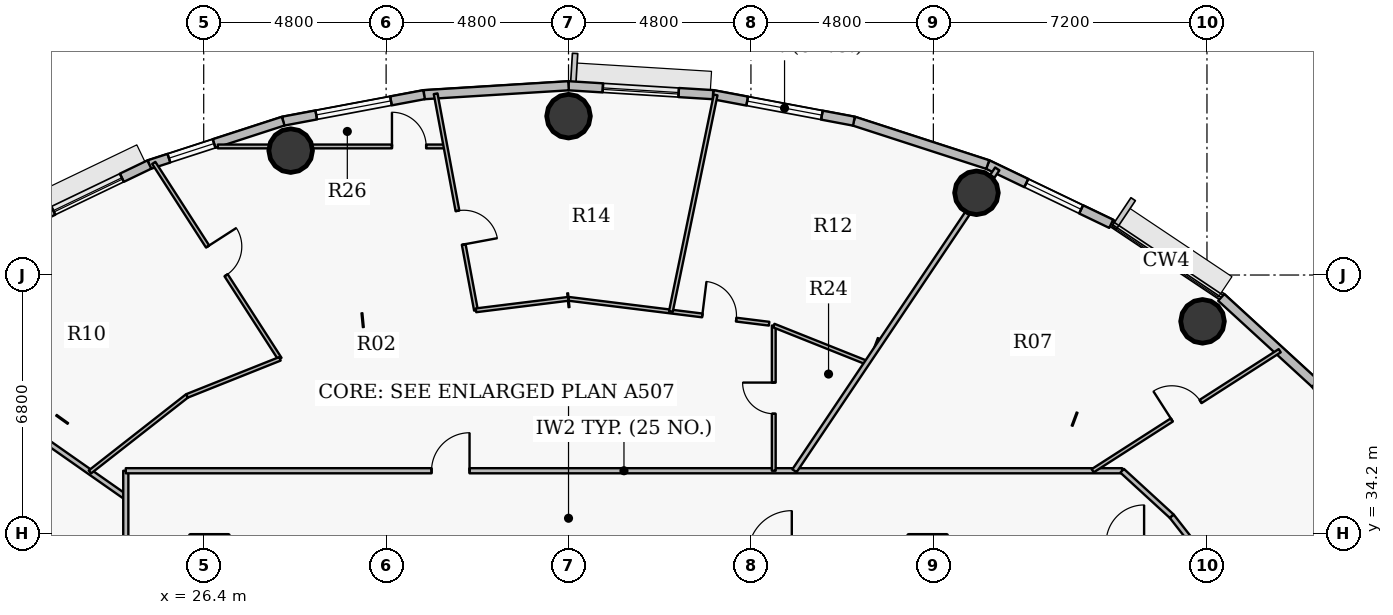
"""IFC4 building model, lengths in metres.
Left out: names, types, materials, properties, quantities, classifications, styles, units other than length and angle.
Written with IfcOpenShell. Run it as: python <this file> out.ifc"""

import sys

from ifc_helpers import new_model, si_unit, direction, frame, frame_2d, origin, origin_2d, place, context, subcontext, project, spatial, rectangle, hollow_circle, extrude, source, transform, mapped, element, fill, save


model = new_model("IFC4")
c1 = context("Model", 3, precision=1e-05, world=origin(), true_north=direction((0.0, 1.0)))
c2 = subcontext(c1, "Body", "Model", "MODEL_VIEW")
j1 = project(units=[si_unit("LENGTHUNIT", "METRE"), si_unit("PLANEANGLEUNIT", "RADIAN")], contexts=[c1])
p1 = place(None, origin())
s1 = spatial("IfcSite", under=j1, at=p1, CompositionType="ELEMENT")
p2 = place(p1, origin())
s2 = spatial("IfcBuilding", under=s1, at=p2, CompositionType="ELEMENT")
p3 = place(p2, frame((0.0, 0.0, 251.55)))
s3 = spatial("IfcBuildingStorey", under=s2, at=p3, CompositionType="ELEMENT", Elevation=251.55)
for number, where, z_axis, x_axis in (
    (1, (52.683, 39.781, 0.0), (0.0, 0.0, 1.0), (1.0, 0.0, 0.0)),
    (2, (46.735, 43.164, 0.0), (0.0, 0.0, 1.0), (1.0, 0.0, 0.0)),
    (3, (36.0, 45.18, 0.0), (0.0, 0.0, 1.0), (1.0, 0.0, 0.0)),
    (4, (28.688, 44.273, 0.0), (0.0, 0.0, 1.0), (1.0, 0.0, 0.0)),
):
    element("IfcColumn", number, at=place(p3, frame(where, z_axis=z_axis, x_axis=x_axis)), inside=s3, PredefinedType="COLUMN", context=c2, shape_type="SweptSolid", body=[
        extrude(hollow_circle(Radius=0.575, WallThickness=0.036, at=origin_2d()), origin(), (0.0, 0.0, 1.0), 3.75),
    ])
p4 = place(p3, frame((55.648, 38.145, 0.0), z_axis=(0.0, 0.0, 1.0), x_axis=(0.616312344705, -0.787501805562, 0.0)))
e5 = element("IfcWall", 5, at=p4, inside=s3, PredefinedType="SOLIDWALL", context=c2, shape_type="SweptSolid", body=[
    extrude(rectangle(XDim=3.225, YDim=0.24, at=frame_2d((1.612, 0.0))), origin(), (0.0, 0.0, 1.0), 3.5),
])
p5 = place(p4, frame((0.812, 0.0, 0.9)))
e6 = element("IfcOpeningElement", 6, at=p5, cuts=e5, PredefinedType="OPENING", context=c2, shape_type="SweptSolid", body=[
    extrude(rectangle(XDim=1.6, YDim=1.75, at=origin_2d()), frame((0.8, 0.13, 0.875), z_axis=(0.0, -1.0, 0.0), x_axis=(1.0, 0.0, 0.0)), (0.0, 0.0, 1.0), 0.26),
])
p6 = place(p3, frame((53.176, 40.411, 0.0), z_axis=(0.0, 0.0, 1.0), x_axis=(0.737123922599, -0.675757591694, 0.0)))
e7 = element("IfcWall", 7, at=p6, inside=s3, PredefinedType="SOLIDWALL", context=c2, shape_type="SweptSolid", body=[
    extrude(rectangle(XDim=3.354, YDim=0.24, at=frame_2d((1.677, 0.0))), origin(), (0.0, 0.0, 1.0), 3.5),
])
p7 = place(p3, frame((47.031, 43.906, 0.0), z_axis=(0.0, 0.0, 1.0), x_axis=(0.901598104751, -0.432574684313, 0.0)))
e8 = element("IfcWall", 8, at=p7, inside=s3, PredefinedType="SOLIDWALL", context=c2, shape_type="SweptSolid", body=[
    extrude(rectangle(XDim=3.604, YDim=0.24, at=frame_2d((1.802, 0.0))), origin(), (0.0, 0.0, 1.0), 3.5),
])
p8 = place(p7, frame((1.126, 0.0, 0.9)))
e9 = element("IfcOpeningElement", 9, at=p8, cuts=e8, PredefinedType="OPENING", context=c2, shape_type="SweptSolid", body=[
    extrude(rectangle(XDim=1.6, YDim=1.75, at=origin_2d()), frame((0.8, 0.13, 0.875), z_axis=(0.0, -1.0, 0.0), x_axis=(1.0, 0.0, 0.0)), (0.0, 0.0, 1.0), 0.26),
])
p9 = place(p3, frame((43.509, 45.049, 0.0), z_axis=(0.0, 0.0, 1.0), x_axis=(0.951210789182, -0.308541787354, 0.0)))
e10 = element("IfcWall", 10, at=p9, inside=s3, PredefinedType="SOLIDWALL", context=c2, shape_type="SweptSolid", body=[
    extrude(rectangle(XDim=3.702, YDim=0.24, at=frame_2d((1.851, 0.0))), origin(), (0.0, 0.0, 1.0), 3.5),
])
p10 = place(p3, frame((39.802, 45.746, 0.0), z_axis=(0.0, 0.0, 1.0), x_axis=(0.982784898575, -0.184753465822, 0.0)))
e11 = element("IfcWall", 11, at=p10, inside=s3, PredefinedType="SOLIDWALL", context=c2, shape_type="SweptSolid", body=[
    extrude(rectangle(XDim=3.773, YDim=0.24, at=frame_2d((1.886, 0.0))), origin(), (0.0, 0.0, 1.0), 3.5),
])
p11 = place(p10, frame((0.916, 0.0, 0.9)))
e12 = element("IfcOpeningElement", 12, at=p11, cuts=e11, PredefinedType="OPENING", context=c2, shape_type="SweptSolid", body=[
    extrude(rectangle(XDim=2.0, YDim=1.75, at=origin_2d()), frame((1.0, 0.13, 0.875), z_axis=(0.0, -1.0, 0.0), x_axis=(1.0, 0.0, 0.0)), (0.0, 0.0, 1.0), 0.26),
])
p12 = place(p3, frame((36.0, 45.98, 0.0), z_axis=(0.0, 0.0, 1.0), x_axis=(0.998108785312, -0.06147237333, 0.0)))
e13 = element("IfcWall", 13, at=p12, inside=s3, PredefinedType="SOLIDWALL", context=c2, shape_type="SweptSolid", body=[
    extrude(rectangle(XDim=3.809, YDim=0.24, at=frame_2d((1.904, 0.0))), origin(), (0.0, 0.0, 1.0), 3.5),
])
p13 = place(p12, frame((0.904, 0.0, 0.9)))
e14 = element("IfcOpeningElement", 14, at=p13, cuts=e13, PredefinedType="OPENING", context=c2, shape_type="SweptSolid", body=[
    extrude(rectangle(XDim=2.0, YDim=1.75, at=origin_2d()), frame((1.0, 0.13, 0.875), z_axis=(0.0, -1.0, 0.0), x_axis=(1.0, 0.0, 0.0)), (0.0, 0.0, 1.0), 0.26),
])
p14 = place(p3, frame((32.198, 45.746, 0.0), z_axis=(0.0, 0.0, 1.0), x_axis=(0.998108785312, 0.06147237333, 0.0)))
e15 = element("IfcWall", 15, at=p14, inside=s3, PredefinedType="SOLIDWALL", context=c2, shape_type="SweptSolid", body=[
    extrude(rectangle(XDim=3.809, YDim=0.24, at=frame_2d((1.904, 0.0))), origin(), (0.0, 0.0, 1.0), 3.5),
])
p15 = place(p3, frame((28.491, 45.049, 0.0), z_axis=(0.0, 0.0, 1.0), x_axis=(0.982784898575, 0.184753465822, 0.0)))
e16 = element("IfcWall", 16, at=p15, inside=s3, PredefinedType="SOLIDWALL", context=c2, shape_type="SweptSolid", body=[
    extrude(rectangle(XDim=3.773, YDim=0.24, at=frame_2d((1.886, 0.0))), origin(), (0.0, 0.0, 1.0), 3.5),
])
p16 = place(p15, frame((0.886, 0.0, 0.9)))
e17 = element("IfcOpeningElement", 17, at=p16, cuts=e16, PredefinedType="OPENING", context=c2, shape_type="SweptSolid", body=[
    extrude(rectangle(XDim=2.0, YDim=1.75, at=origin_2d()), frame((1.0, 0.13, 0.875), z_axis=(0.0, -1.0, 0.0), x_axis=(1.0, 0.0, 0.0)), (0.0, 0.0, 1.0), 0.26),
])
p17 = place(p3, frame((24.969, 43.906, 0.0), z_axis=(0.0, 0.0, 1.0), x_axis=(0.951210789182, 0.308541787354, 0.0)))
e18 = element("IfcWall", 18, at=p17, inside=s3, PredefinedType="SOLIDWALL", context=c2, shape_type="SweptSolid", body=[
    extrude(rectangle(XDim=3.702, YDim=0.24, at=frame_2d((1.851, 0.0))), origin(), (0.0, 0.0, 1.0), 3.5),
])
p18 = place(p17, frame((0.542, 0.0, 0.9)))
e19 = element("IfcOpeningElement", 19, at=p18, cuts=e18, PredefinedType="OPENING", context=c2, shape_type="SweptSolid", body=[
    extrude(rectangle(XDim=1.25, YDim=1.65, at=origin_2d()), frame((0.625, 0.13, 0.825), z_axis=(0.0, -1.0, 0.0), x_axis=(1.0, 0.0, 0.0)), (0.0, 0.0, 1.0), 0.26),
])
p19 = place(p3, frame((21.72, 42.348, 0.0), z_axis=(0.0, 0.0, 1.0), x_axis=(0.901598104751, 0.432574684313, 0.0)))
e20 = element("IfcWall", 20, at=p19, inside=s3, PredefinedType="SOLIDWALL", context=c2, shape_type="SweptSolid", body=[
    extrude(rectangle(XDim=3.604, YDim=0.24, at=frame_2d((1.802, 0.0))), origin(), (0.0, 0.0, 1.0), 3.5),
])
p20 = place(p19, frame((0.802, 0.0, 0.9)))
e21 = element("IfcOpeningElement", 21, at=p20, cuts=e20, PredefinedType="OPENING", context=c2, shape_type="SweptSolid", body=[
    extrude(rectangle(XDim=2.0, YDim=1.75, at=origin_2d()), frame((1.0, 0.13, 0.875), z_axis=(0.0, -1.0, 0.0), x_axis=(1.0, 0.0, 0.0)), (0.0, 0.0, 1.0), 0.26),
])
p21 = place(p3, frame((17.964, 39.629, 0.0), z_axis=(0.0, 0.0, 1.0), x_axis=(0.819162769896, -0.573561118292, 0.0)))
e22 = element("IfcWall", 22, at=p21, inside=s3, PredefinedType="PARTITIONING", context=c2, shape_type="SweptSolid", body=[
    extrude(rectangle(XDim=7.796, YDim=0.135, at=frame_2d((3.898, 0.0))), origin(), (0.0, 0.0, 1.0), 2.985),
])
p22 = place(p3, frame((23.406, 35.819, 0.0), z_axis=(0.0, 0.0, 1.0), x_axis=(0.787387506959, 0.616458363465, 0.0)))
e23 = element("IfcWall", 23, at=p22, inside=s3, PredefinedType="PARTITIONING", context=c2, shape_type="SweptSolid", body=[
    extrude(rectangle(XDim=3.245, YDim=0.1, at=frame_2d((1.623, 0.0))), origin(), (0.0, 0.0, 1.0), 2.935),
])
p23 = place(p3, frame((24.35, 27.95, 0.0), z_axis=(0.0, 0.0, 1.0), x_axis=(0.0, 1.0, 0.0)))
e24 = element("IfcWall", 24, at=p23, inside=s3, PredefinedType="PARTITIONING", context=c2, shape_type="SweptSolid", body=[
    extrude(rectangle(XDim=7.9, YDim=0.135, at=frame_2d((3.95, 0.0))), origin(), (0.0, 0.0, 1.0), 2.935),
])
p24 = place(p23, frame((3.099, 0.0, 0.0)))
e25 = element("IfcOpeningElement", 25, at=p24, cuts=e24, PredefinedType="OPENING", context=c2, shape_type="SweptSolid", body=[
    extrude(rectangle(XDim=1.05, YDim=2.15, at=origin_2d()), frame((0.525, 0.078, 1.075), z_axis=(0.0, -1.0, 0.0), x_axis=(1.0, 0.0, 0.0)), (0.0, 0.0, 1.0), 0.155),
])
p25 = place(p3, frame((24.35, 35.85, 0.0), z_axis=(0.0, 0.0, 1.0), x_axis=(1.0, 0.0, 0.0)))
e26 = element("IfcWall", 26, at=p25, inside=s3, PredefinedType="PARTITIONING", context=c2, shape_type="SweptSolid", body=[
    extrude(rectangle(XDim=26.218, YDim=0.135, at=frame_2d((13.109, 0.0))), origin(), (0.0, 0.0, 1.0), 2.935),
])
p26 = place(p25, frame((8.045, 0.0, 0.0)))
e27 = element("IfcOpeningElement", 27, at=p26, cuts=e26, PredefinedType="OPENING", context=c2, shape_type="SweptSolid", body=[
    extrude(rectangle(XDim=1.0, YDim=2.15, at=origin_2d()), frame((0.5, 0.078, 1.075), z_axis=(0.0, -1.0, 0.0), x_axis=(1.0, 0.0, 0.0)), (0.0, 0.0, 1.0), 0.155),
])
p27 = place(p3, frame((25.086, 43.95, 0.0), z_axis=(0.0, 0.0, 1.0), x_axis=(0.54137931016, -0.840778474112, 0.0)))
e28 = element("IfcWall", 28, at=p27, inside=s3, PredefinedType="PARTITIONING", context=c2, shape_type="SweptSolid", body=[
    extrude(rectangle(XDim=6.131, YDim=0.1, at=frame_2d((3.066, 0.0))), origin(), (0.0, 0.0, 1.0), 2.985),
])
p28 = place(p27, frame((2.615, 0.0, 0.0)))
e29 = element("IfcOpeningElement", 29, at=p28, cuts=e28, PredefinedType="OPENING", context=c2, shape_type="SweptSolid", body=[
    extrude(rectangle(XDim=0.9, YDim=2.1, at=origin_2d()), frame((0.45, 0.06, 1.05), z_axis=(0.0, -1.0, 0.0), x_axis=(1.0, 0.0, 0.0)), (0.0, 0.0, 1.0), 0.12),
])
p29 = place(p3, frame((25.961, 37.819, 0.0), z_axis=(0.0, 0.0, 1.0), x_axis=(0.928796141516, 0.370591051572, 0.0)))
e30 = element("IfcWall", 30, at=p29, inside=s3, PredefinedType="PARTITIONING", context=c2, shape_type="SweptSolid", body=[
    extrude(rectangle(XDim=2.633, YDim=0.1, at=frame_2d((1.316, 0.0))), origin(), (0.0, 0.0, 1.0), 3.5),
])
p30 = place(p3, frame((26.772, 44.383, 0.0), z_axis=(0.0, 0.0, 1.0), x_axis=(1.0, 0.0, 0.0)))
e31 = element("IfcWall", 31, at=p30, inside=s3, PredefinedType="PARTITIONING", context=c2, shape_type="SweptSolid", body=[
    extrude(rectangle(XDim=5.99, YDim=0.1, at=frame_2d((2.995, 0.0))), origin(), (0.0, 0.0, 1.0), 2.985),
])
p31 = place(p30, frame((4.582, 0.0, 0.0)))
e32 = element("IfcOpeningElement", 32, at=p31, cuts=e31, PredefinedType="OPENING", context=c2, shape_type="SweptSolid", body=[
    extrude(rectangle(XDim=0.9, YDim=2.1, at=origin_2d()), frame((0.45, 0.06, 1.05), z_axis=(0.0, -1.0, 0.0), x_axis=(1.0, 0.0, 0.0)), (0.0, 0.0, 1.0), 0.12),
])
p32 = place(p3, frame((32.503, 45.77, 0.0), z_axis=(0.0, 0.0, 1.0), x_axis=(0.183138923076, -0.983087043376, 0.0)))
e33 = element("IfcWall", 33, at=p32, inside=s3, PredefinedType="PARTITIONING", context=c2, shape_type="SweptSolid", body=[
    extrude(rectangle(XDim=5.796, YDim=0.1, at=frame_2d((2.898, 0.0))), origin(), (0.0, 0.0, 1.0), 2.985),
])
p33 = place(p32, frame((3.133, 0.0, 0.0)))
e34 = element("IfcOpeningElement", 34, at=p33, cuts=e33, PredefinedType="OPENING", context=c2, shape_type="SweptSolid", body=[
    extrude(rectangle(XDim=0.9, YDim=2.1, at=origin_2d()), frame((0.45, 0.06, 1.05), z_axis=(0.0, -1.0, 0.0), x_axis=(1.0, 0.0, 0.0)), (0.0, 0.0, 1.0), 0.12),
])
p34 = place(p3, frame((33.565, 40.072, 0.0), z_axis=(0.0, 0.0, 1.0), x_axis=(0.992396815028, 0.1230794927, 0.0)))
e35 = element("IfcWall", 35, at=p34, inside=s3, PredefinedType="PARTITIONING", context=c2, shape_type="SweptSolid", body=[
    extrude(rectangle(XDim=2.454, YDim=0.1, at=frame_2d((1.227, 0.0))), origin(), (0.0, 0.0, 1.0), 2.935),
])
p35 = place(p3, frame((36.0, 40.374, 0.0), z_axis=(0.0, 0.0, 1.0), x_axis=(0.992398169186, -0.123068573551, 0.0)))
e36 = element("IfcWall", 36, at=p35, inside=s3, PredefinedType="PARTITIONING", context=c2, shape_type="SweptSolid", body=[
    extrude(rectangle(XDim=5.319, YDim=0.1, at=frame_2d((2.659, 0.0))), origin(), (0.0, 0.0, 1.0), 2.935),
])
p36 = place(p35, frame((3.546, 0.0, 0.0)))
e37 = element("IfcOpeningElement", 37, at=p36, cuts=e36, PredefinedType="OPENING", context=c2, shape_type="SweptSolid", body=[
    extrude(rectangle(XDim=0.9, YDim=2.1, at=origin_2d()), frame((0.45, 0.06, 1.05), z_axis=(0.0, -1.0, 0.0), x_axis=(1.0, 0.0, 0.0)), (0.0, 0.0, 1.0), 0.12),
])
p37 = place(p3, frame((38.694, 40.04, 0.0), z_axis=(0.0, 0.0, 1.0), x_axis=(0.20228508648, 0.979326678789, 0.0)))
e38 = element("IfcWall", 38, at=p37, inside=s3, PredefinedType="PARTITIONING", context=c2, shape_type="SweptSolid", body=[
    extrude(rectangle(XDim=5.819, YDim=0.1, at=frame_2d((2.909, 0.0))), origin(), (0.0, 0.0, 1.0), 2.985),
])
p38 = place(p3, frame((41.401, 35.85, 0.0), z_axis=(0.0, 0.0, 1.0), x_axis=(0.0, 1.0, 0.0)))
e39 = element("IfcWall", 39, at=p38, inside=s3, PredefinedType="PARTITIONING", context=c2, shape_type="SweptSolid", body=[
    extrude(rectangle(XDim=3.82, YDim=0.1, at=frame_2d((1.91, 0.0))), origin(), (0.0, 0.0, 1.0), 3.5),
])
p39 = place(p38, frame((1.5, 0.0, 0.0)))
e40 = element("IfcOpeningElement", 40, at=p39, cuts=e39, PredefinedType="OPENING", context=c2, shape_type="SweptSolid", body=[
    extrude(rectangle(XDim=0.82, YDim=2.1, at=origin_2d()), frame((0.41, 0.06, 1.05), z_axis=(0.0, -1.0, 0.0), x_axis=(1.0, 0.0, 0.0)), (0.0, 0.0, 1.0), 0.12),
])
p40 = place(p3, frame((41.401, 39.67, 0.0), z_axis=(0.0, 0.0, 1.0), x_axis=(0.92880772077, -0.370562029677, 0.0)))
e41 = element("IfcWall", 41, at=p40, inside=s3, PredefinedType="PARTITIONING", context=c2, shape_type="SweptSolid", body=[
    extrude(rectangle(XDim=2.642, YDim=0.1, at=frame_2d((1.321, 0.0))), origin(), (0.0, 0.0, 1.0), 2.935),
])
p41 = place(p3, frame((41.946, 35.85, 0.0), z_axis=(0.0, 0.0, 1.0), x_axis=(0.557670345873, 0.830062518931, 0.0)))
e42 = element("IfcWall", 42, at=p41, inside=s3, PredefinedType="PARTITIONING", context=c2, shape_type="SweptSolid", body=[
    extrude(rectangle(XDim=9.568, YDim=0.135, at=frame_2d((4.784, 0.0))), origin(), (0.0, 0.0, 1.0), 2.935),
])
p42 = place(p3, frame((49.792, 35.85, 0.0), z_axis=(0.0, 0.0, 1.0), x_axis=(0.841640734873, 0.540037844416, 0.0)))
e43 = element("IfcWall", 43, at=p42, inside=s3, PredefinedType="PARTITIONING", context=c2, shape_type="SweptSolid", body=[
    extrude(rectangle(XDim=5.848, YDim=0.1, at=frame_2d((2.924, 0.0))), origin(), (0.0, 0.0, 1.0), 2.985),
])
p43 = place(p42, frame((2.474, 0.0, 0.0)))
e44 = element("IfcOpeningElement", 44, at=p43, cuts=e43, PredefinedType="OPENING", context=c2, shape_type="SweptSolid", body=[
    extrude(rectangle(XDim=0.9, YDim=2.1, at=origin_2d()), frame((0.45, 0.06, 1.05), z_axis=(0.0, -1.0, 0.0), x_axis=(1.0, 0.0, 0.0)), (0.0, 0.0, 1.0), 0.12),
])
p44 = place(p3, frame((50.568, 35.85, 0.0), z_axis=(0.0, 0.0, 1.0), x_axis=(0.737102657331, -0.675780787353, 0.0)))
e45 = element("IfcWall", 45, at=p44, inside=s3, PredefinedType="PARTITIONING", context=c2, shape_type="SweptSolid", body=[
    extrude(rectangle(XDim=1.772, YDim=0.135, at=frame_2d((0.886, 0.0))), origin(), (0.0, 0.0, 1.0), 3.5),
])
p45 = place(p3, frame((51.874, 34.653, 0.0), z_axis=(0.0, 0.0, 1.0), x_axis=(0.61628613448, -0.787522317429, 0.0)))
e46 = element("IfcWall", 46, at=p45, inside=s3, PredefinedType="PARTITIONING", context=c2, shape_type="SweptSolid", body=[
    extrude(rectangle(XDim=0.893, YDim=0.135, at=frame_2d((0.446, 0.0))), origin(), (0.0, 0.0, 1.0), 3.5),
])
m1 = source(origin(), c2, "Body", "SweptSolid", [
    extrude(rectangle(XDim=1.6, YDim=1.75, at=origin_2d()), frame((0.8, 0.03, 0.875), z_axis=(0.0, -1.0, 0.0), x_axis=(1.0, 0.0, 0.0)), (0.0, 0.0, 1.0), 0.06),
])
p46 = place(p8, origin())
e47 = element("IfcWindow", 47, at=p46, inside=s3, PartitioningType="DOUBLE_PANEL_VERTICAL", PredefinedType="WINDOW", context=c2, shape_type="MappedRepresentation", body=[
    mapped(m1, transform((0.0, 0.0, 0.0), x_axis=(1.0, 0.0, 0.0), y_axis=(0.0, 1.0, 0.0), z_axis=(0.0, 0.0, 1.0), scale=1.0)),
])
fill(e9, e47)
m2 = source(origin(), c2, "Body", "SweptSolid", [
    extrude(rectangle(XDim=2.0, YDim=1.75, at=origin_2d()), frame((1.0, 0.03, 0.875), z_axis=(0.0, -1.0, 0.0), x_axis=(1.0, 0.0, 0.0)), (0.0, 0.0, 1.0), 0.06),
])
p47 = place(p11, origin())
e48 = element("IfcWindow", 48, at=p47, inside=s3, PartitioningType="DOUBLE_PANEL_VERTICAL", PredefinedType="WINDOW", context=c2, shape_type="MappedRepresentation", body=[
    mapped(m2, transform((0.0, 0.0, 0.0), x_axis=(1.0, 0.0, 0.0), y_axis=(0.0, 1.0, 0.0), z_axis=(0.0, 0.0, 1.0), scale=1.0)),
])
fill(e12, e48)
p48 = place(p13, origin())
e49 = element("IfcWindow", 49, at=p48, inside=s3, PartitioningType="DOUBLE_PANEL_VERTICAL", PredefinedType="WINDOW", context=c2, shape_type="MappedRepresentation", body=[
    mapped(m2, transform((0.0, 0.0, 0.0), x_axis=(1.0, 0.0, 0.0), y_axis=(0.0, 1.0, 0.0), z_axis=(0.0, 0.0, 1.0), scale=1.0)),
])
fill(e14, e49)
p49 = place(p16, origin())
e50 = element("IfcWindow", 50, at=p49, inside=s3, PartitioningType="DOUBLE_PANEL_VERTICAL", PredefinedType="WINDOW", context=c2, shape_type="MappedRepresentation", body=[
    mapped(m2, transform((0.0, 0.0, 0.0), x_axis=(1.0, 0.0, 0.0), y_axis=(0.0, 1.0, 0.0), z_axis=(0.0, 0.0, 1.0), scale=1.0)),
])
fill(e17, e50)
p50 = place(p20, origin())
e51 = element("IfcWindow", 51, at=p50, inside=s3, PartitioningType="DOUBLE_PANEL_VERTICAL", PredefinedType="WINDOW", context=c2, shape_type="MappedRepresentation", body=[
    mapped(m2, transform((0.0, 0.0, 0.0), x_axis=(1.0, 0.0, 0.0), y_axis=(0.0, 1.0, 0.0), z_axis=(0.0, 0.0, 1.0), scale=1.0)),
])
fill(e21, e51)
m3 = source(origin(), c2, "Body", "SweptSolid", [
    extrude(rectangle(XDim=1.25, YDim=1.65, at=origin_2d()), frame((0.625, 0.03, 0.825), z_axis=(0.0, -1.0, 0.0), x_axis=(1.0, 0.0, 0.0)), (0.0, 0.0, 1.0), 0.06),
])
p51 = place(p18, origin())
e52 = element("IfcWindow", 52, at=p51, inside=s3, PartitioningType="SINGLE_PANEL", PredefinedType="WINDOW", context=c2, shape_type="MappedRepresentation", body=[
    mapped(m3, transform((0.0, 0.0, 0.0), x_axis=(1.0, 0.0, 0.0), y_axis=(0.0, 1.0, 0.0), z_axis=(0.0, 0.0, 1.0), scale=1.0)),
])
fill(e19, e52)
m4 = source(origin(), c2, "Body", "SweptSolid", [
    extrude(rectangle(XDim=0.9, YDim=2.1, at=origin_2d()), frame((0.45, 0.025, 1.05), z_axis=(0.0, -1.0, 0.0), x_axis=(1.0, 0.0, 0.0)), (0.0, 0.0, 1.0), 0.05),
])
p52 = place(p43, origin())
e53 = element("IfcDoor", 53, at=p52, inside=s3, OperationType="SINGLE_SWING_LEFT", PredefinedType="DOOR", context=c2, shape_type="MappedRepresentation", body=[
    mapped(m4, transform((0.0, 0.0, 0.0), x_axis=(1.0, 0.0, 0.0), y_axis=(0.0, 1.0, 0.0), z_axis=(0.0, 0.0, 1.0), scale=1.0)),
])
fill(e44, e53)
m5 = source(origin(), c2, "Body", "SweptSolid", [
    extrude(rectangle(XDim=1.0, YDim=2.15, at=origin_2d()), frame((0.5, 0.025, 1.075), z_axis=(0.0, -1.0, 0.0), x_axis=(1.0, 0.0, 0.0)), (0.0, 0.0, 1.0), 0.05),
])
p53 = place(p26, origin())
e54 = element("IfcDoor", 54, at=p53, inside=s3, OperationType="SINGLE_SWING_RIGHT", PredefinedType="DOOR", context=c2, shape_type="MappedRepresentation", body=[
    mapped(m5, transform((0.0, 0.0, 0.0), x_axis=(1.0, 0.0, 0.0), y_axis=(0.0, 1.0, 0.0), z_axis=(0.0, 0.0, 1.0), scale=1.0)),
])
fill(e27, e54)
p54 = place(p36, origin())
e55 = element("IfcDoor", 55, at=p54, inside=s3, OperationType="SINGLE_SWING_LEFT", PredefinedType="DOOR", context=c2, shape_type="MappedRepresentation", body=[
    mapped(m4, transform((0.0, 0.0, 0.0), x_axis=(1.0, 0.0, 0.0), y_axis=(0.0, 1.0, 0.0), z_axis=(0.0, 0.0, 1.0), scale=1.0)),
])
fill(e37, e55)
p55 = place(p33, origin())
e56 = element("IfcDoor", 56, at=p55, inside=s3, OperationType="SINGLE_SWING_RIGHT", PredefinedType="DOOR", context=c2, shape_type="MappedRepresentation", body=[
    mapped(m4, transform((0.0, 0.0, 0.0), x_axis=(1.0, 0.0, 0.0), y_axis=(0.0, 1.0, 0.0), z_axis=(0.0, 0.0, 1.0), scale=1.0)),
])
fill(e34, e56)
p56 = place(p28, origin())
e57 = element("IfcDoor", 57, at=p56, inside=s3, OperationType="SINGLE_SWING_LEFT", PredefinedType="DOOR", context=c2, shape_type="MappedRepresentation", body=[
    mapped(m4, transform((0.0, 0.0, 0.0), x_axis=(1.0, 0.0, 0.0), y_axis=(0.0, 1.0, 0.0), z_axis=(0.0, 0.0, 1.0), scale=1.0)),
])
fill(e29, e57)
m6 = source(origin(), c2, "Body", "SweptSolid", [
    extrude(rectangle(XDim=0.82, YDim=2.1, at=origin_2d()), frame((0.41, 0.025, 1.05), z_axis=(0.0, -1.0, 0.0), x_axis=(1.0, 0.0, 0.0)), (0.0, 0.0, 1.0), 0.05),
])
p57 = place(p39, origin())
e58 = element("IfcDoor", 58, at=p57, inside=s3, OperationType="SINGLE_SWING_RIGHT", PredefinedType="DOOR", context=c2, shape_type="MappedRepresentation", body=[
    mapped(m6, transform((0.0, 0.0, 0.0), x_axis=(1.0, 0.0, 0.0), y_axis=(0.0, 1.0, 0.0), z_axis=(0.0, 0.0, 1.0), scale=1.0)),
])
fill(e40, e58)
p58 = place(p31, origin())
e59 = element("IfcDoor", 59, at=p58, inside=s3, OperationType="SINGLE_SWING_LEFT", PredefinedType="DOOR", context=c2, shape_type="MappedRepresentation", body=[
    mapped(m4, transform((0.0, 0.0, 0.0), x_axis=(1.0, 0.0, 0.0), y_axis=(0.0, 1.0, 0.0), z_axis=(0.0, 0.0, 1.0), scale=1.0)),
])
fill(e32, e59)
save(model, sys.argv[1])
